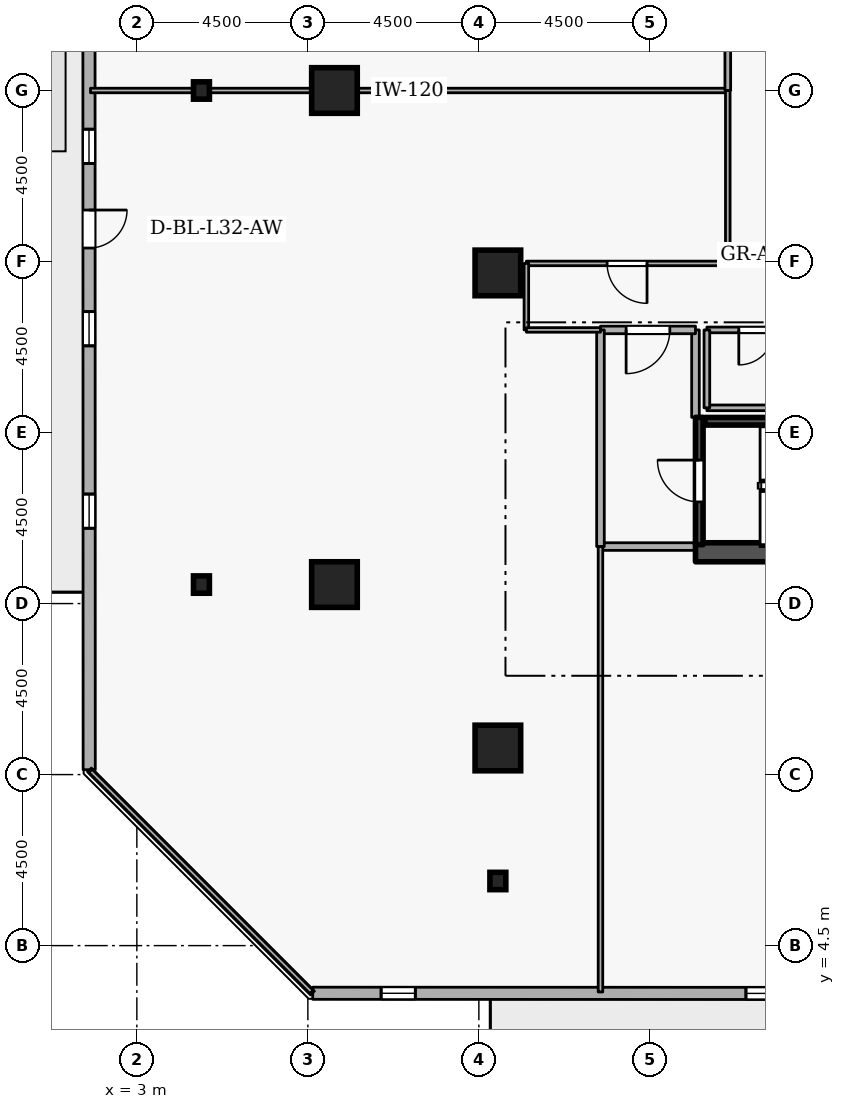
"""IFC4 building model, lengths in metres.
Left out: names, types, materials, properties, quantities, classifications, styles, units other than length and angle.
Written with IfcOpenShell. Run it as: python <this file> out.ifc"""

import sys

from ifc_helpers import new_model, si_unit, direction, frame, frame_2d, origin, origin_2d, place, context, subcontext, project, spatial, rectangle, i_section, extrude, element, fill, save


model = new_model("IFC4")
c1 = context("Model", 3, precision=1e-05, world=origin(), true_north=direction((0.0, 1.0)))
c2 = subcontext(c1, "Body", "Model", "MODEL_VIEW")
j1 = project(units=[si_unit("LENGTHUNIT", "METRE"), si_unit("PLANEANGLEUNIT", "RADIAN")], contexts=[c1])
p1 = place(None, origin())
s1 = spatial("IfcSite", under=j1, at=p1, CompositionType="ELEMENT")
p2 = place(p1, origin())
s2 = spatial("IfcBuilding", under=s1, at=p2, CompositionType="ELEMENT")
p3 = place(p2, frame((0.0, 0.0, 123.3)))
s3 = spatial("IfcBuildingStorey", under=s2, at=p3, CompositionType="ELEMENT", Elevation=123.3)
p4 = place(p3, frame((17.7, 14.85, 0.0), z_axis=(0.0, 0.0, 1.0), x_axis=(1.0, 0.0, 0.0)))
e1 = element("IfcWall", 1, at=p4, inside=s3, PredefinedType="SHEAR", context=c2, shape_type="SweptSolid", body=[
    extrude(rectangle(XDim=15.6, YDim=0.5, at=frame_2d((7.8, 0.0))), origin(), (0.0, 0.0, 1.0), 3.6),
])
for number, where, z_axis, x_axis in (
    (2, (12.5, 9.7, 0.0), (0.0, 0.0, 1.0), (1.0, 0.0, 0.0)),
    (3, (8.2, 14.0, 0.0), (0.0, 0.0, 1.0), (1.0, 0.0, 0.0)),
    (4, (8.2, 27.0, 0.0), (0.0, 0.0, 1.0), (1.0, 0.0, 0.0)),
    (5, (12.5, 22.2, 0.0), (0.0, 0.0, 1.0), (1.0, 0.0, 0.0)),
):
    element("IfcColumn", number, at=place(p3, frame(where, z_axis=z_axis, x_axis=x_axis)), inside=s3, PredefinedType="COLUMN", context=c2, shape_type="SweptSolid", body=[
        extrude(rectangle(XDim=1.2, YDim=1.2, at=origin_2d()), origin(), (0.0, 0.0, 1.0), 3.6),
    ])
for number, where, z_axis, x_axis in (
    (6, (12.5, 6.2, 0.0), (0.0, 0.0, 1.0), (1.0, 0.0, 0.0)),
    (7, (4.7, 14.0, 0.0), (0.0, 0.0, 1.0), (1.0, 0.0, 0.0)),
    (8, (4.7, 27.0, 0.0), (0.0, 0.0, 1.0), (1.0, 0.0, 0.0)),
):
    element("IfcColumn", number, at=place(p3, frame(where, z_axis=z_axis, x_axis=x_axis)), inside=s3, PredefinedType="COLUMN", context=c2, shape_type="SweptSolid", body=[
        extrude(i_section(OverallWidth=0.418, OverallDepth=0.456, WebThickness=0.042, FlangeThickness=0.067, FilletRadius=0.015, at=origin_2d()), origin(), (0.0, 0.0, 1.0), 3.6),
    ])
p5 = place(p3, frame((7.628, 3.246, 0.0), z_axis=(0.0, 0.0, 1.0), x_axis=(0.999999944762, -0.000332378036, 0.0)))
e9 = element("IfcWall", 9, at=p5, inside=s3, PredefinedType="STANDARD", context=c2, shape_type="SweptSolid", body=[
    extrude(rectangle(XDim=33.054, YDim=0.32, at=frame_2d((16.527, 0.0))), origin(), (0.0, 0.0, 1.0), 2.7),
])
p6 = place(p5, frame((25.977, 0.0, 0.0)))
e10 = element("IfcOpeningElement", 10, at=p6, cuts=e9, PredefinedType="OPENING", context=c2, shape_type="SweptSolid", body=[
    extrude(rectangle(XDim=1.0, YDim=2.08, at=frame_2d((0.5, 1.04))), frame((0.0, 0.17, 0.0), z_axis=(0.0, -1.0, 0.0), x_axis=(1.0, 0.0, 0.0)), (0.0, 0.0, 1.0), 0.34),
])
p7 = place(p5, frame((1.8, 0.0, 0.72)))
e11 = element("IfcOpeningElement", 11, at=p7, cuts=e9, PredefinedType="OPENING", context=c2, shape_type="SweptSolid", body=[
    extrude(rectangle(XDim=0.9, YDim=1.75, at=frame_2d((0.45, 0.875))), frame((0.0, 0.17, 0.0), z_axis=(0.0, -1.0, 0.0), x_axis=(1.0, 0.0, 0.0)), (0.0, 0.0, 1.0), 0.34),
])
p8 = place(p5, frame((11.4, 0.0, 0.72)))
e12 = element("IfcOpeningElement", 12, at=p8, cuts=e9, PredefinedType="OPENING", context=c2, shape_type="SweptSolid", body=[
    extrude(rectangle(XDim=0.9, YDim=1.75, at=frame_2d((0.45, 0.875))), frame((0.0, 0.17, 0.0), z_axis=(0.0, -1.0, 0.0), x_axis=(1.0, 0.0, 0.0)), (0.0, 0.0, 1.0), 0.34),
])
p9 = place(p5, frame((16.2, 0.0, 0.72)))
e13 = element("IfcOpeningElement", 13, at=p9, cuts=e9, PredefinedType="OPENING", context=c2, shape_type="SweptSolid", body=[
    extrude(rectangle(XDim=0.9, YDim=1.75, at=frame_2d((0.45, 0.875))), frame((0.0, 0.17, 0.0), z_axis=(0.0, -1.0, 0.0), x_axis=(1.0, 0.0, 0.0)), (0.0, 0.0, 1.0), 0.34),
])
p10 = place(p5, frame((21.0, 0.0, 0.72)))
e14 = element("IfcOpeningElement", 14, at=p10, cuts=e9, PredefinedType="OPENING", context=c2, shape_type="SweptSolid", body=[
    extrude(rectangle(XDim=0.9, YDim=1.75, at=frame_2d((0.45, 0.875))), frame((0.0, 0.17, 0.0), z_axis=(0.0, -1.0, 0.0), x_axis=(1.0, 0.0, 0.0)), (0.0, 0.0, 1.0), 0.34),
])
p11 = place(p3, frame((1.735, 42.181, 0.0), z_axis=(0.0, 0.0, 1.0), x_axis=(0.000332378036, -0.999999944762, 0.0)))
e15 = element("IfcWall", 15, at=p11, inside=s3, PredefinedType="STANDARD", context=c2, shape_type="SweptSolid", body=[
    extrude(rectangle(XDim=33.054, YDim=0.32, at=frame_2d((16.527, 0.0))), origin(), (0.0, 0.0, 1.0), 2.7),
])
p12 = place(p11, frame((18.327, 0.0, 0.0)))
e16 = element("IfcOpeningElement", 16, at=p12, cuts=e15, PredefinedType="OPENING", context=c2, shape_type="SweptSolid", body=[
    extrude(rectangle(XDim=1.0, YDim=2.08, at=frame_2d((0.5, 1.04))), frame((0.0, 0.17, 0.0), z_axis=(0.0, -1.0, 0.0), x_axis=(1.0, 0.0, 0.0)), (0.0, 0.0, 1.0), 0.34),
])
p13 = place(p11, frame((1.8, 0.0, 0.72)))
e17 = element("IfcOpeningElement", 17, at=p13, cuts=e15, PredefinedType="OPENING", context=c2, shape_type="SweptSolid", body=[
    extrude(rectangle(XDim=0.9, YDim=1.75, at=frame_2d((0.45, 0.875))), frame((0.0, 0.17, 0.0), z_axis=(0.0, -1.0, 0.0), x_axis=(1.0, 0.0, 0.0)), (0.0, 0.0, 1.0), 0.34),
])
p14 = place(p11, frame((6.6, 0.0, 0.72)))
e18 = element("IfcOpeningElement", 18, at=p14, cuts=e15, PredefinedType="OPENING", context=c2, shape_type="SweptSolid", body=[
    extrude(rectangle(XDim=0.9, YDim=1.75, at=frame_2d((0.45, 0.875))), frame((0.0, 0.17, 0.0), z_axis=(0.0, -1.0, 0.0), x_axis=(1.0, 0.0, 0.0)), (0.0, 0.0, 1.0), 0.34),
])
p15 = place(p11, frame((11.4, 0.0, 0.72)))
e19 = element("IfcOpeningElement", 19, at=p15, cuts=e15, PredefinedType="OPENING", context=c2, shape_type="SweptSolid", body=[
    extrude(rectangle(XDim=0.9, YDim=1.75, at=frame_2d((0.45, 0.875))), frame((0.0, 0.17, 0.0), z_axis=(0.0, -1.0, 0.0), x_axis=(1.0, 0.0, 0.0)), (0.0, 0.0, 1.0), 0.34),
])
p16 = place(p11, frame((16.2, 0.0, 0.72)))
e20 = element("IfcOpeningElement", 20, at=p16, cuts=e15, PredefinedType="OPENING", context=c2, shape_type="SweptSolid", body=[
    extrude(rectangle(XDim=0.9, YDim=1.75, at=frame_2d((0.45, 0.875))), frame((0.0, 0.17, 0.0), z_axis=(0.0, -1.0, 0.0), x_axis=(1.0, 0.0, 0.0)), (0.0, 0.0, 1.0), 0.34),
])
p17 = place(p11, frame((21.0, 0.0, 0.72)))
e21 = element("IfcOpeningElement", 21, at=p17, cuts=e15, PredefinedType="OPENING", context=c2, shape_type="SweptSolid", body=[
    extrude(rectangle(XDim=0.9, YDim=1.75, at=frame_2d((0.45, 0.875))), frame((0.0, 0.17, 0.0), z_axis=(0.0, -1.0, 0.0), x_axis=(1.0, 0.0, 0.0)), (0.0, 0.0, 1.0), 0.34),
])
p18 = place(p11, frame((25.8, 0.0, 0.72)))
e22 = element("IfcOpeningElement", 22, at=p18, cuts=e15, PredefinedType="OPENING", context=c2, shape_type="SweptSolid", body=[
    extrude(rectangle(XDim=0.9, YDim=1.75, at=frame_2d((0.45, 0.875))), frame((0.0, 0.17, 0.0), z_axis=(0.0, -1.0, 0.0), x_axis=(1.0, 0.0, 0.0)), (0.0, 0.0, 1.0), 0.34),
])
p19 = place(p3, frame((17.8, 15.05, 0.0), z_axis=(0.0, 0.0, 1.0), x_axis=(0.0, 1.0, 0.0)))
e23 = element("IfcWall", 23, at=p19, inside=s3, PredefinedType="SHEAR", context=c2, shape_type="SweptSolid", body=[
    extrude(rectangle(XDim=3.35, YDim=0.2, at=frame_2d((1.675, 0.0))), origin(), (0.0, 0.0, 1.0), 3.6),
])
p20 = place(p19, frame((1.125, 0.0, 0.0)))
e24 = element("IfcOpeningElement", 24, at=p20, cuts=e23, PredefinedType="OPENING", context=c2, shape_type="SweptSolid", body=[
    extrude(rectangle(XDim=1.1, YDim=2.1, at=frame_2d((0.55, 1.05))), frame((0.0, 0.11, 0.0), z_axis=(0.0, -1.0, 0.0), x_axis=(1.0, 0.0, 0.0)), (0.0, 0.0, 1.0), 0.22),
])
p21 = place(p3, frame((25.05, 18.297, 0.0), z_axis=(0.0, 0.0, 1.0), x_axis=(-1.0, 0.0, 0.0)))
e25 = element("IfcWall", 25, at=p21, inside=s3, PredefinedType="SHEAR", context=c2, shape_type="SweptSolid", body=[
    extrude(rectangle(XDim=7.1, YDim=0.2, at=frame_2d((3.55, 0.0))), origin(), (0.0, 0.0, 1.0), 3.6),
])
p22 = place(p3, frame((15.2, 15.0, 0.0), z_axis=(0.0, 0.0, 1.0), x_axis=(1.0, 0.0, 0.0)))
e26 = element("IfcWall", 26, at=p22, inside=s3, PredefinedType="STANDARD", context=c2, shape_type="SweptSolid", body=[
    extrude(rectangle(XDim=2.5, YDim=0.2, at=frame_2d((1.25, 0.0))), origin(), (0.0, 0.0, 1.0), 3.34),
])
p23 = place(p3, frame((17.7, 18.4, 0.0), z_axis=(0.0, 0.0, 1.0), x_axis=(0.0, 1.0, 0.0)))
e27 = element("IfcWall", 27, at=p23, inside=s3, PredefinedType="STANDARD", context=c2, shape_type="SweptSolid", body=[
    extrude(rectangle(XDim=2.3, YDim=0.2, at=frame_2d((1.15, 0.0))), origin(), (0.0, 0.0, 1.0), 2.545),
])
p24 = place(p3, frame((17.7, 20.7, 0.0), z_axis=(0.0, 0.0, 1.0), x_axis=(-1.0, 0.0, 0.0)))
e28 = element("IfcWall", 28, at=p24, inside=s3, PredefinedType="STANDARD", context=c2, shape_type="SweptSolid", body=[
    extrude(rectangle(XDim=2.5, YDim=0.2, at=frame_2d((1.25, 0.0))), origin(), (0.0, 0.0, 1.0), 3.34),
])
p25 = place(p24, frame((0.675, 0.0, 0.0)))
e29 = element("IfcOpeningElement", 29, at=p25, cuts=e28, PredefinedType="OPENING", context=c2, shape_type="SweptSolid", body=[
    extrude(rectangle(XDim=1.15, YDim=2.1, at=frame_2d((0.575, 1.05))), frame((0.0, 0.11, 0.0), z_axis=(0.0, -1.0, 0.0), x_axis=(1.0, 0.0, 0.0)), (0.0, 0.0, 1.0), 0.22),
])
p26 = place(p3, frame((15.2, 20.7, 0.0), z_axis=(0.0, 0.0, 1.0), x_axis=(0.0, -1.0, 0.0)))
e30 = element("IfcWall", 30, at=p26, inside=s3, PredefinedType="STANDARD", context=c2, shape_type="SweptSolid", body=[
    extrude(rectangle(XDim=5.7, YDim=0.2, at=frame_2d((2.85, 0.0))), origin(), (0.0, 0.0, 1.0), 3.34),
])
p27 = place(p3, frame((18.0, 18.65, 0.0), z_axis=(0.0, 0.0, 1.0), x_axis=(1.0, 0.0, 0.0)))
e31 = element("IfcWall", 31, at=p27, inside=s3, PredefinedType="PARTITIONING", context=c2, shape_type="SweptSolid", body=[
    extrude(rectangle(XDim=2.6, YDim=0.15, at=frame_2d((1.3, 0.0))), origin(), (0.0, 0.0, 1.0), 3.34),
])
p28 = place(p3, frame((20.6, 20.7, 0.0), z_axis=(0.0, 0.0, 1.0), x_axis=(-1.0, 0.0, 0.0)))
e32 = element("IfcWall", 32, at=p28, inside=s3, PredefinedType="PARTITIONING", context=c2, shape_type="SweptSolid", body=[
    extrude(rectangle(XDim=2.6, YDim=0.15, at=frame_2d((1.3, 0.0))), origin(), (0.0, 0.0, 1.0), 3.34),
])
p29 = place(p28, frame((0.84, 0.0, 0.0)))
e33 = element("IfcOpeningElement", 33, at=p29, cuts=e32, PredefinedType="OPENING", context=c2, shape_type="SweptSolid", body=[
    extrude(rectangle(XDim=0.92, YDim=2.08, at=frame_2d((0.46, 1.04))), frame((0.0, 0.085, 0.0), z_axis=(0.0, -1.0, 0.0), x_axis=(1.0, 0.0, 0.0)), (0.0, 0.0, 1.0), 0.17),
])
p30 = place(p3, frame((18.0, 20.7, 0.0), z_axis=(0.0, 0.0, 1.0), x_axis=(0.0, -1.0, 0.0)))
e34 = element("IfcWall", 34, at=p30, inside=s3, PredefinedType="PARTITIONING", context=c2, shape_type="SweptSolid", body=[
    extrude(rectangle(XDim=2.05, YDim=0.15, at=frame_2d((1.025, 0.0))), origin(), (0.0, 0.0, 1.0), 2.545),
])
p31 = place(p3, frame((18.55, 22.45, 0.0), z_axis=(0.0, 0.0, 1.0), x_axis=(-1.0, 0.0, 0.0)))
e35 = element("IfcWall", 35, at=p31, inside=s3, PredefinedType="PARTITIONING", context=c2, shape_type="SweptSolid", body=[
    extrude(rectangle(XDim=5.3, YDim=0.12, at=frame_2d((2.65, 0.0))), origin(), (0.0, 0.0, 1.0), 3.34),
])
p32 = place(p31, frame((2.125, 0.0, 0.0)))
e36 = element("IfcOpeningElement", 36, at=p32, cuts=e35, PredefinedType="OPENING", context=c2, shape_type="SweptSolid", body=[
    extrude(rectangle(XDim=1.05, YDim=2.1, at=frame_2d((0.525, 1.05))), frame((0.0, 0.07, 0.0), z_axis=(0.0, -1.0, 0.0), x_axis=(1.0, 0.0, 0.0)), (0.0, 0.0, 1.0), 0.14),
])
p33 = place(p3, frame((13.25, 22.45, 0.0), z_axis=(0.0, 0.0, 1.0), x_axis=(0.0, -1.0, 0.0)))
e37 = element("IfcWall", 37, at=p33, inside=s3, PredefinedType="PARTITIONING", context=c2, shape_type="SweptSolid", body=[
    extrude(rectangle(XDim=1.75, YDim=0.12, at=frame_2d((0.875, 0.0))), origin(), (0.0, 0.0, 1.0), 3.34),
])
p34 = place(p3, frame((13.25, 20.7, 0.0), z_axis=(0.0, 0.0, 1.0), x_axis=(1.0, 0.0, 0.0)))
e38 = element("IfcWall", 38, at=p34, inside=s3, PredefinedType="PARTITIONING", context=c2, shape_type="SweptSolid", body=[
    extrude(rectangle(XDim=1.95, YDim=0.12, at=frame_2d((0.975, 0.0))), origin(), (0.0, 0.0, 1.0), 3.34),
])
p35 = place(p3, frame((15.2, 15.0, 0.0), z_axis=(0.0, 0.0, 1.0), x_axis=(0.0, -1.0, 0.0)))
e39 = element("IfcWall", 39, at=p35, inside=s3, PredefinedType="PARTITIONING", context=c2, shape_type="SweptSolid", body=[
    extrude(rectangle(XDim=11.72, YDim=0.12, at=frame_2d((5.86, 0.0))), origin(), (0.0, 0.0, 1.0), 3.34),
])
p36 = place(p3, frame((7.598, 3.28, 0.0), z_axis=(0.0, 0.0, 1.0), x_axis=(-0.707106781187, 0.707106781187, 0.0)))
e40 = element("IfcWall", 40, at=p36, inside=s3, PredefinedType="PARTITIONING", context=c2, shape_type="SweptSolid", body=[
    extrude(rectangle(XDim=8.227, YDim=0.12, at=frame_2d((4.114, 0.0))), origin(), (0.0, 0.0, 1.0), 3.34),
])
p37 = place(p3, frame((1.78, 27.0, 0.0), z_axis=(0.0, 0.0, 1.0), x_axis=(1.0, 0.0, 0.0)))
e41 = element("IfcWall", 41, at=p37, inside=s3, PredefinedType="PARTITIONING", context=c2, shape_type="SweptSolid", body=[
    extrude(rectangle(XDim=16.77, YDim=0.12, at=frame_2d((8.385, 0.0))), origin(), (0.0, 0.0, 1.0), 2.932),
])
p38 = place(p3, frame((18.55, 27.0, 0.0), z_axis=(0.0, 0.0, 1.0), x_axis=(0.0, -1.0, 0.0)))
e42 = element("IfcWall", 42, at=p38, inside=s3, PredefinedType="PARTITIONING", context=c2, shape_type="SweptSolid", body=[
    extrude(rectangle(XDim=4.55, YDim=0.12, at=frame_2d((2.275, 0.0))), origin(), (0.0, 0.0, 1.0), 3.34),
])
p39 = place(p3, frame((18.55, 31.55, 0.0), z_axis=(0.0, 0.0, 1.0), x_axis=(0.0, -1.0, 0.0)))
e43 = element("IfcWall", 43, at=p39, inside=s3, PredefinedType="PARTITIONING", context=c2, shape_type="SweptSolid", body=[
    extrude(rectangle(XDim=4.55, YDim=0.15, at=frame_2d((2.275, 0.0))), origin(), (0.0, 0.0, 1.0), 3.34),
])
p40 = place(p7, origin())
e44 = element("IfcWindow", 44, at=p40, inside=s3, PartitioningType="SINGLE_PANEL", PredefinedType="WINDOW", context=c2, shape_type="SweptSolid", body=[
    extrude(rectangle(XDim=0.9, YDim=1.75, at=frame_2d((0.45, 0.875))), frame((0.0, 0.03, 0.0), z_axis=(0.0, -1.0, 0.0), x_axis=(1.0, 0.0, 0.0)), (0.0, 0.0, 1.0), 0.06),
])
fill(e11, e44)
p41 = place(p8, origin())
e45 = element("IfcWindow", 45, at=p41, inside=s3, PartitioningType="SINGLE_PANEL", PredefinedType="WINDOW", context=c2, shape_type="SweptSolid", body=[
    extrude(rectangle(XDim=0.9, YDim=1.75, at=frame_2d((0.45, 0.875))), frame((0.0, 0.03, 0.0), z_axis=(0.0, -1.0, 0.0), x_axis=(1.0, 0.0, 0.0)), (0.0, 0.0, 1.0), 0.06),
])
fill(e12, e45)
p42 = place(p12, origin())
e46 = element("IfcDoor", 46, at=p42, inside=s3, OperationType="SINGLE_SWING_LEFT", PredefinedType="DOOR", context=c2, shape_type="SweptSolid", body=[
    extrude(rectangle(XDim=1.0, YDim=2.08, at=frame_2d((0.5, 1.04))), frame((0.0, 0.025, 0.0), z_axis=(0.0, -1.0, 0.0), x_axis=(1.0, 0.0, 0.0)), (0.0, 0.0, 1.0), 0.05),
])
fill(e16, e46)
p43 = place(p16, origin())
e47 = element("IfcWindow", 47, at=p43, inside=s3, PartitioningType="SINGLE_PANEL", PredefinedType="WINDOW", context=c2, shape_type="SweptSolid", body=[
    extrude(rectangle(XDim=0.9, YDim=1.75, at=frame_2d((0.45, 0.875))), frame((0.0, 0.03, 0.0), z_axis=(0.0, -1.0, 0.0), x_axis=(1.0, 0.0, 0.0)), (0.0, 0.0, 1.0), 0.06),
])
fill(e20, e47)
p44 = place(p17, origin())
e48 = element("IfcWindow", 48, at=p44, inside=s3, PartitioningType="SINGLE_PANEL", PredefinedType="WINDOW", context=c2, shape_type="SweptSolid", body=[
    extrude(rectangle(XDim=0.9, YDim=1.75, at=frame_2d((0.45, 0.875))), frame((0.0, 0.03, 0.0), z_axis=(0.0, -1.0, 0.0), x_axis=(1.0, 0.0, 0.0)), (0.0, 0.0, 1.0), 0.06),
])
fill(e21, e48)
p45 = place(p18, origin())
e49 = element("IfcWindow", 49, at=p45, inside=s3, PartitioningType="SINGLE_PANEL", PredefinedType="WINDOW", context=c2, shape_type="SweptSolid", body=[
    extrude(rectangle(XDim=0.9, YDim=1.75, at=frame_2d((0.45, 0.875))), frame((0.0, 0.03, 0.0), z_axis=(0.0, -1.0, 0.0), x_axis=(1.0, 0.0, 0.0)), (0.0, 0.0, 1.0), 0.06),
])
fill(e22, e49)
p46 = place(p20, origin())
e50 = element("IfcDoor", 50, at=p46, inside=s3, OperationType="SINGLE_SWING_RIGHT", PredefinedType="DOOR", context=c2, shape_type="SweptSolid", body=[
    extrude(rectangle(XDim=1.1, YDim=2.1, at=frame_2d((0.55, 1.05))), frame((0.0, 0.025, 0.0), z_axis=(0.0, -1.0, 0.0), x_axis=(1.0, 0.0, 0.0)), (0.0, 0.0, 1.0), 0.05),
])
fill(e24, e50)
p47 = place(p25, origin())
e51 = element("IfcDoor", 51, at=p47, inside=s3, OperationType="SINGLE_SWING_RIGHT", PredefinedType="DOOR", context=c2, shape_type="SweptSolid", body=[
    extrude(rectangle(XDim=1.15, YDim=2.1, at=frame_2d((0.575, 1.05))), frame((0.0, 0.025, 0.0), z_axis=(0.0, -1.0, 0.0), x_axis=(1.0, 0.0, 0.0)), (0.0, 0.0, 1.0), 0.05),
])
fill(e29, e51)
p48 = place(p29, origin())
e52 = element("IfcDoor", 52, at=p48, inside=s3, OperationType="SINGLE_SWING_RIGHT", PredefinedType="DOOR", context=c2, shape_type="SweptSolid", body=[
    extrude(rectangle(XDim=0.92, YDim=2.08, at=frame_2d((0.46, 1.04))), frame((0.0, 0.025, 0.0), z_axis=(0.0, -1.0, 0.0), x_axis=(1.0, 0.0, 0.0)), (0.0, 0.0, 1.0), 0.05),
])
fill(e33, e52)
p49 = place(p32, origin())
e53 = element("IfcDoor", 53, at=p49, inside=s3, OperationType="SINGLE_SWING_LEFT", PredefinedType="DOOR", context=c2, shape_type="SweptSolid", body=[
    extrude(rectangle(XDim=1.05, YDim=2.1, at=frame_2d((0.525, 1.05))), frame((0.0, 0.025, 0.0), z_axis=(0.0, -1.0, 0.0), x_axis=(1.0, 0.0, 0.0)), (0.0, 0.0, 1.0), 0.05),
])
fill(e36, e53)
save(model, sys.argv[1])
